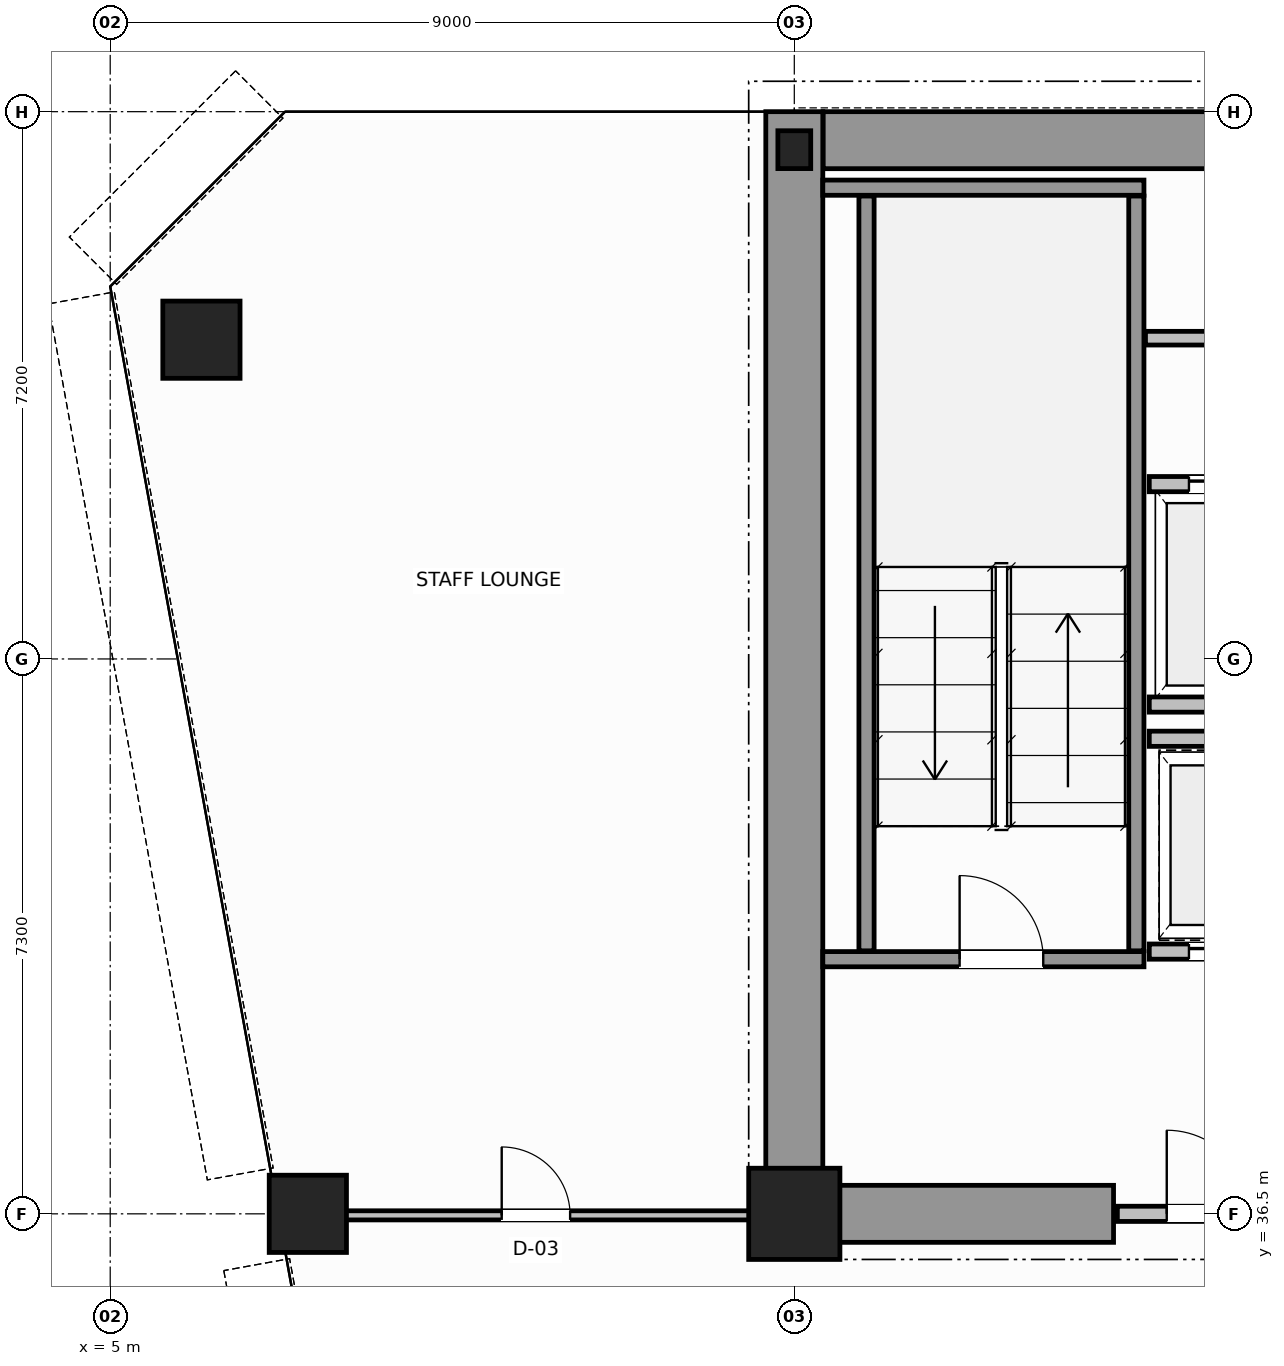
"""IFC4 building model, lengths in metres.
Left out: names, types, materials, properties, quantities, classifications, styles, units other than length and angle.
Written with IfcOpenShell. Run it as: python <this file> out.ifc"""

import sys

from ifc_helpers import new_model, si_unit, direction, frame, frame_2d, origin, origin_2d, place, context, subcontext, project, spatial, rectangle, hollow_circle, i_section, extrude, source, transform, mapped, element, fill, save


model = new_model("IFC4")
c1 = context("Model", 3, precision=1e-05, world=origin(), true_north=direction((0.0, 1.0)))
c2 = subcontext(c1, "Body", "Model", "MODEL_VIEW")
j1 = project(units=[si_unit("LENGTHUNIT", "METRE"), si_unit("PLANEANGLEUNIT", "RADIAN")], contexts=[c1])
p1 = place(None, origin())
s1 = spatial("IfcSite", under=j1, at=p1, CompositionType="ELEMENT")
p2 = place(p1, origin())
s2 = spatial("IfcBuilding", under=s1, at=p2, CompositionType="ELEMENT")
p3 = place(p2, frame((0.0, 0.0, 145.2)))
s3 = spatial("IfcBuildingStorey", under=s2, at=p3, CompositionType="ELEMENT", Elevation=145.2)
m1 = source(origin(), c2, "Body", "SweptSolid", [
    extrude(rectangle(XDim=1.2, YDim=1.2, at=origin_2d()), origin(), (0.0, 0.0, 1.0), 3.8),
])
p4 = place(p3, frame((14.0, 36.5, 0.0), z_axis=(0.0, 0.0, 1.0), x_axis=(1.0, 0.0, 0.0)))
e1 = element("IfcColumn", 1, at=p4, inside=s3, PredefinedType="COLUMN", context=c2, shape_type="MappedRepresentation", body=[
    mapped(m1, transform((0.0, 0.0, 0.0), scale=1.0)),
])
m2 = source(origin(), c2, "Body", "SweptSolid", [
    extrude(i_section(OverallWidth=0.432, OverallDepth=0.498, WebThickness=0.055, FlangeThickness=0.068, FilletRadius=0.015, at=origin_2d()), origin(), (0.0, 0.0, 1.0), 3.8),
])
p5 = place(p3, frame((14.0, 50.5, 0.0), z_axis=(0.0, 0.0, 1.0), x_axis=(1.0, 0.0, 0.0)))
e2 = element("IfcColumn", 2, at=p5, inside=s3, PredefinedType="COLUMN", context=c2, shape_type="MappedRepresentation", body=[
    mapped(m2, transform((0.0, 0.0, 0.0), scale=1.0)),
])
m3 = source(origin(), c2, "Body", "SweptSolid", [
    extrude(hollow_circle(Radius=0.508, WallThickness=0.045, at=origin_2d()), origin(), (0.0, 0.0, 1.0), 3.8),
])
for number, where, z_axis, x_axis in (
    (3, (6.2, 48.0, 0.0), (0.0, 0.0, 1.0), (1.0, 0.0, 0.0)),
    (4, (7.6, 36.5, 0.0), (0.0, 0.0, 1.0), (1.0, 0.0, 0.0)),
):
    element("IfcColumn", number, at=place(p3, frame(where, z_axis=z_axis, x_axis=x_axis)), inside=s3, PredefinedType="COLUMN", context=c2, shape_type="MappedRepresentation", body=[
        mapped(m3, transform((0.0, 0.0, 0.0), scale=1.0)),
    ])
p6 = place(p3, frame((14.379, 50.625, 0.0), z_axis=(0.0, 0.0, 1.0), x_axis=(1.0, 0.0, 0.0)))
e5 = element("IfcWall", 5, at=p6, inside=s3, PredefinedType="SHEAR", context=c2, shape_type="SweptSolid", body=[
    extrude(rectangle(XDim=19.619, YDim=0.75, at=frame_2d((9.81, 0.0))), origin(), (0.0, 0.0, 1.0), 3.8),
])
p7 = place(p3, frame((14.0, 36.5, 0.0), z_axis=(0.0, 0.0, 1.0), x_axis=(0.0, 1.0, 0.0)))
e6 = element("IfcWall", 6, at=p7, inside=s3, PredefinedType="SHEAR", context=c2, shape_type="SweptSolid", body=[
    extrude(rectangle(XDim=14.5, YDim=0.75, at=frame_2d((7.25, 0.0))), origin(), (0.0, 0.0, 1.0), 3.8),
])
p8 = place(p3, frame((14.395, 36.5, 0.0), z_axis=(0.0, 0.0, 1.0), x_axis=(1.0, 0.0, 0.0)))
e7 = element("IfcWall", 7, at=p8, inside=s3, PredefinedType="SHEAR", context=c2, shape_type="SweptSolid", body=[
    extrude(rectangle(XDim=3.805, YDim=0.75, at=frame_2d((1.902, 0.0))), origin(), (0.0, 0.0, 1.0), 2.34),
])
p9 = place(p3, frame((14.375, 39.85, 0.0), z_axis=(0.0, 0.0, 1.0), x_axis=(1.0, 0.0, 0.0)))
e8 = element("IfcWall", 8, at=p9, inside=s3, PredefinedType="SOLIDWALL", context=c2, shape_type="SweptSolid", body=[
    extrude(rectangle(XDim=4.225, YDim=0.2, at=frame_2d((2.113, 0.0))), origin(), (0.0, 0.0, 1.0), 3.8),
])
p10 = place(p9, frame((1.8, 0.0, 0.0)))
e9 = element("IfcOpeningElement", 9, at=p10, cuts=e8, PredefinedType="OPENING", context=c2, shape_type="SweptSolid", body=[
    extrude(rectangle(XDim=1.1, YDim=2.15, at=frame_2d((0.55, 1.075))), frame((0.0, 0.11, 0.0), z_axis=(0.0, -1.0, 0.0), x_axis=(1.0, 0.0, 0.0)), (0.0, 0.0, 1.0), 0.22),
])
p11 = place(p3, frame((14.375, 50.0, 0.0), z_axis=(0.0, 0.0, 1.0), x_axis=(1.0, 0.0, 0.0)))
e10 = element("IfcWall", 10, at=p11, inside=s3, PredefinedType="SOLIDWALL", context=c2, shape_type="SweptSolid", body=[
    extrude(rectangle(XDim=4.225, YDim=0.2, at=frame_2d((2.113, 0.0))), origin(), (0.0, 0.0, 1.0), 3.8),
])
for number, where, z_axis, x_axis in (
    (11, (14.95, 39.96, 0.0), (0.0, 0.0, 1.0), (0.0, 1.0, 0.0)),
    (12, (18.5, 39.96, 0.0), (0.0, 0.0, 1.0), (0.0, 1.0, 0.0)),
):
    element("IfcWall", number, at=place(p3, frame(where, z_axis=z_axis, x_axis=x_axis)), inside=s3, PredefinedType="SOLIDWALL", context=c2, shape_type="SweptSolid", body=[
        extrude(rectangle(XDim=9.93, YDim=0.2, at=frame_2d((4.965, 0.0))), origin(), (0.0, 0.0, 1.0), 3.8),
    ])
p12 = place(p3, frame((18.25, 36.5, 0.0), z_axis=(0.0, 0.0, 1.0), x_axis=(1.0, 0.0, 0.0)))
e13 = element("IfcWall", 13, at=p12, inside=s3, PredefinedType="SOLIDWALL", context=c2, shape_type="SweptSolid", body=[
    extrude(rectangle(XDim=2.47, YDim=0.2, at=frame_2d((1.235, 0.0))), origin(), (0.0, 0.0, 1.0), 2.33),
])
p13 = place(p12, frame((0.65, 0.0, 0.0)))
e14 = element("IfcOpeningElement", 14, at=p13, cuts=e13, PredefinedType="OPENING", context=c2, shape_type="SweptSolid", body=[
    extrude(rectangle(XDim=1.1, YDim=2.15, at=frame_2d((0.55, 1.075))), frame((0.0, 0.11, 0.0), z_axis=(0.0, -1.0, 0.0), x_axis=(1.0, 0.0, 0.0)), (0.0, 0.0, 1.0), 0.22),
])
p14 = place(p3, frame((18.67, 46.1, 0.0), z_axis=(0.0, 0.0, 1.0), x_axis=(1.0, 0.0, 0.0)))
e15 = element("IfcWall", 15, at=p14, inside=s3, PredefinedType="SOLIDWALL", context=c2, shape_type="SweptSolid", body=[
    extrude(rectangle(XDim=2.145, YDim=0.2, at=frame_2d((1.073, 0.0))), origin(), (0.0, 0.0, 1.0), 3.54),
])
p15 = place(p14, frame((0.522, 0.0, 0.0)))
e16 = element("IfcOpeningElement", 16, at=p15, cuts=e15, PredefinedType="OPENING", context=c2, shape_type="SweptSolid", body=[
    extrude(rectangle(XDim=1.1, YDim=2.15, at=frame_2d((0.55, 1.075))), frame((0.0, 0.11, 0.0), z_axis=(0.0, -1.0, 0.0), x_axis=(1.0, 0.0, 0.0)), (0.0, 0.0, 1.0), 0.22),
])
p16 = place(p3, frame((18.67, 43.2, 0.0), z_axis=(0.0, 0.0, 1.0), x_axis=(1.0, 0.0, 0.0)))
e17 = element("IfcWall", 17, at=p16, inside=s3, PredefinedType="SOLIDWALL", context=c2, shape_type="SweptSolid", body=[
    extrude(rectangle(XDim=2.145, YDim=0.2, at=frame_2d((1.073, 0.0))), origin(), (0.0, 0.0, 1.0), 3.54),
])
p17 = place(p3, frame((18.67, 39.95, 0.0), z_axis=(0.0, 0.0, 1.0), x_axis=(1.0, 0.0, 0.0)))
e18 = element("IfcWall", 18, at=p17, inside=s3, PredefinedType="SOLIDWALL", context=c2, shape_type="SweptSolid", body=[
    extrude(rectangle(XDim=2.145, YDim=0.2, at=frame_2d((1.073, 0.0))), origin(), (0.0, 0.0, 1.0), 3.54),
])
p18 = place(p17, frame((0.522, 0.0, 0.0)))
e19 = element("IfcOpeningElement", 19, at=p18, cuts=e18, PredefinedType="OPENING", context=c2, shape_type="SweptSolid", body=[
    extrude(rectangle(XDim=1.1, YDim=2.15, at=frame_2d((0.55, 1.075))), frame((0.0, 0.11, 0.0), z_axis=(0.0, -1.0, 0.0), x_axis=(1.0, 0.0, 0.0)), (0.0, 0.0, 1.0), 0.22),
])
p19 = place(p3, frame((18.67, 42.75, 0.0), z_axis=(0.0, 0.0, 1.0), x_axis=(1.0, 0.0, 0.0)))
e20 = element("IfcWall", 20, at=p19, inside=s3, PredefinedType="SOLIDWALL", context=c2, shape_type="SweptSolid", body=[
    extrude(rectangle(XDim=2.145, YDim=0.2, at=frame_2d((1.073, 0.0))), origin(), (0.0, 0.0, 1.0), 3.54),
])
p20 = place(p3, frame((18.62, 48.02, 0.0), z_axis=(0.0, 0.0, 1.0), x_axis=(1.0, 0.0, 0.0)))
e21 = element("IfcWall", 21, at=p20, inside=s3, PredefinedType="PLUMBINGWALL", context=c2, shape_type="SweptSolid", body=[
    extrude(rectangle(XDim=30.76, YDim=0.18, at=frame_2d((15.38, 0.0))), origin(), (0.0, 0.0, 1.0), 3.54),
])
p21 = place(p20, frame((1.955, 0.0, 0.0)))
e22 = element("IfcOpeningElement", 22, at=p21, cuts=e21, PredefinedType="OPENING", context=c2, shape_type="SweptSolid", body=[
    extrude(rectangle(XDim=0.9, YDim=2.15, at=frame_2d((0.45, 1.075))), frame((0.0, 0.1, 0.0), z_axis=(0.0, -1.0, 0.0), x_axis=(1.0, 0.0, 0.0)), (0.0, 0.0, 1.0), 0.2),
])
p22 = place(p20, frame((8.03, 0.0, 0.0)))
e23 = element("IfcOpeningElement", 23, at=p22, cuts=e21, PredefinedType="OPENING", context=c2, shape_type="SweptSolid", body=[
    extrude(rectangle(XDim=0.9, YDim=2.15, at=frame_2d((0.45, 1.075))), frame((0.0, 0.1, 0.0), z_axis=(0.0, -1.0, 0.0), x_axis=(1.0, 0.0, 0.0)), (0.0, 0.0, 1.0), 0.2),
])
p23 = place(p20, frame((16.93, 0.0, 0.0)))
e24 = element("IfcOpeningElement", 24, at=p23, cuts=e21, PredefinedType="OPENING", context=c2, shape_type="SweptSolid", body=[
    extrude(rectangle(XDim=0.9, YDim=2.15, at=frame_2d((0.45, 1.075))), frame((0.0, 0.1, 0.0), z_axis=(0.0, -1.0, 0.0), x_axis=(1.0, 0.0, 0.0)), (0.0, 0.0, 1.0), 0.2),
])
p24 = place(p20, frame((26.205, 0.0, 0.0)))
e25 = element("IfcOpeningElement", 25, at=p24, cuts=e21, PredefinedType="OPENING", context=c2, shape_type="SweptSolid", body=[
    extrude(rectangle(XDim=0.9, YDim=2.15, at=frame_2d((0.45, 1.075))), frame((0.0, 0.1, 0.0), z_axis=(0.0, -1.0, 0.0), x_axis=(1.0, 0.0, 0.0)), (0.0, 0.0, 1.0), 0.2),
])
p25 = place(p3, frame((7.262, 36.48, 0.0), z_axis=(0.0, 0.0, 1.0), x_axis=(1.0, 0.0, 0.0)))
e26 = element("IfcWall", 26, at=p25, inside=s3, PredefinedType="PARTITIONING", context=c2, shape_type="SweptSolid", body=[
    extrude(rectangle(XDim=6.678, YDim=0.12, at=frame_2d((3.339, 0.0))), origin(), (0.0, 0.0, 1.0), 2.83),
])
p26 = place(p25, frame((2.889, 0.0, 0.0)))
e27 = element("IfcOpeningElement", 27, at=p26, cuts=e26, PredefinedType="OPENING", context=c2, shape_type="SweptSolid", body=[
    extrude(rectangle(XDim=0.9, YDim=2.15, at=frame_2d((0.45, 1.075))), frame((0.0, 0.07, 0.0), z_axis=(0.0, -1.0, 0.0), x_axis=(1.0, 0.0, 0.0)), (0.0, 0.0, 1.0), 0.14),
])
m4 = source(origin(), c2, "Body", "SweptSolid", [
    extrude(rectangle(XDim=1.1, YDim=2.15, at=frame_2d((0.55, 1.075))), frame((0.0, 0.025, 0.0), z_axis=(0.0, -1.0, 0.0), x_axis=(1.0, 0.0, 0.0)), (0.0, 0.0, 1.0), 0.05),
])
p27 = place(p10, origin())
e28 = element("IfcDoor", 28, at=p27, inside=s3, OperationType="SINGLE_SWING_LEFT", PredefinedType="DOOR", context=c2, shape_type="MappedRepresentation", body=[
    mapped(m4, transform((0.0, 0.0, 0.0), scale=1.0)),
])
fill(e9, e28)
p28 = place(p13, origin())
e29 = element("IfcDoor", 29, at=p28, inside=s3, OperationType="SINGLE_SWING_RIGHT", PredefinedType="DOOR", context=c2, shape_type="MappedRepresentation", body=[
    mapped(m4, transform((0.0, 0.0, 0.0), scale=1.0)),
])
fill(e14, e29)
p29 = place(p15, origin())
e30 = element("IfcDoor", 30, at=p29, inside=s3, OperationType="DOUBLE_DOOR_SLIDING", PredefinedType="DOOR", context=c2, shape_type="MappedRepresentation", body=[
    mapped(m4, transform((0.0, 0.0, 0.0), scale=1.0)),
])
fill(e16, e30)
p30 = place(p18, origin())
e31 = element("IfcDoor", 31, at=p30, inside=s3, OperationType="DOUBLE_DOOR_SLIDING", PredefinedType="DOOR", context=c2, shape_type="MappedRepresentation", body=[
    mapped(m4, transform((0.0, 0.0, 0.0), scale=1.0)),
])
fill(e19, e31)
m5 = source(origin(), c2, "Body", "SweptSolid", [
    extrude(rectangle(XDim=0.9, YDim=2.15, at=frame_2d((0.45, 1.075))), frame((0.0, 0.025, 0.0), z_axis=(0.0, -1.0, 0.0), x_axis=(1.0, 0.0, 0.0)), (0.0, 0.0, 1.0), 0.05),
])
p31 = place(p26, origin())
e32 = element("IfcDoor", 32, at=p31, inside=s3, OperationType="SINGLE_SWING_LEFT", PredefinedType="DOOR", context=c2, shape_type="MappedRepresentation", body=[
    mapped(m5, transform((0.0, 0.0, 0.0), scale=1.0)),
])
fill(e27, e32)
save(model, sys.argv[1])
